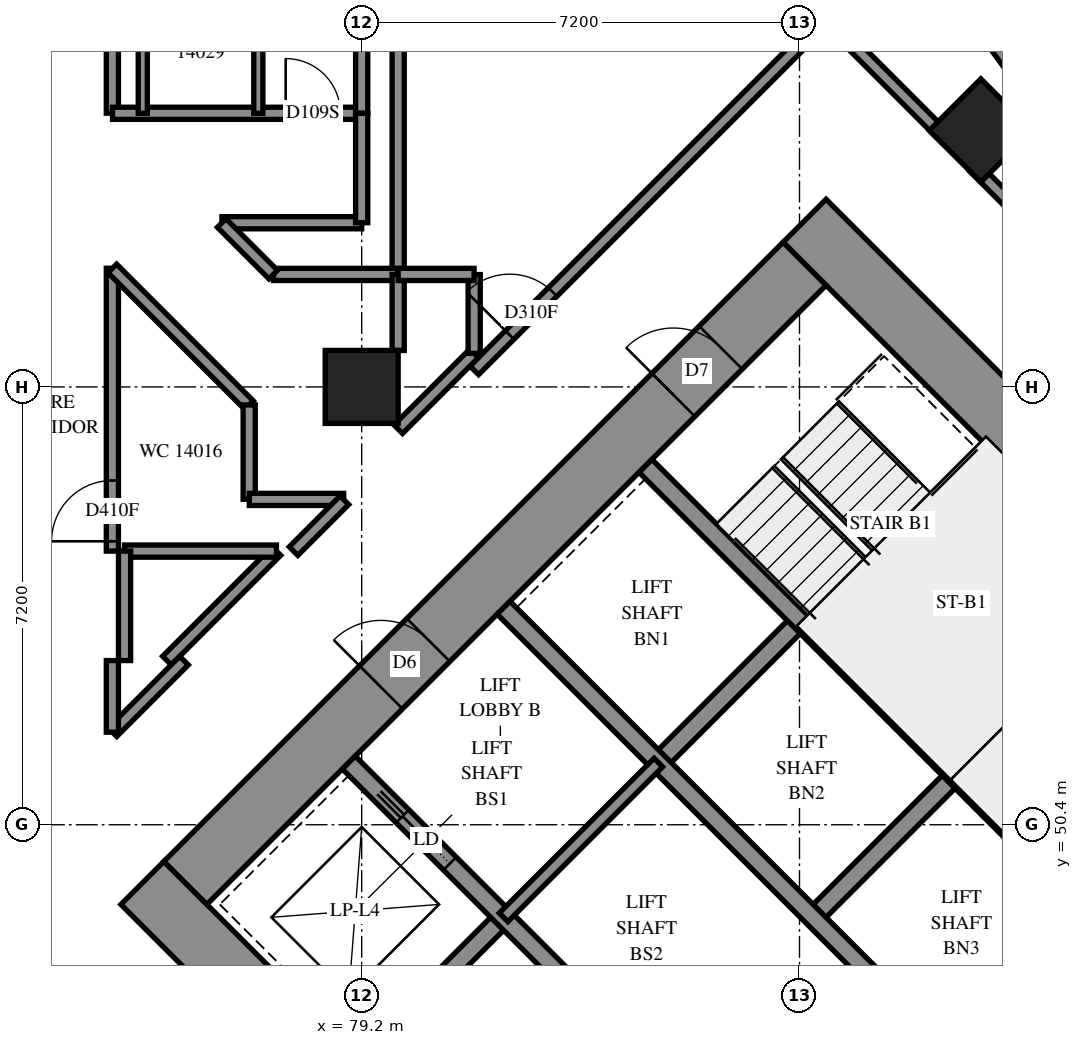
"""IFC4 building model, lengths in metres.
Left out: names, types, materials, properties, quantities, classifications, styles, units other than length and angle.
Written with IfcOpenShell. Run it as: python <this file> out.ifc"""

import sys

from ifc_helpers import new_model, si_unit, direction, frame, frame_2d, origin, origin_2d, place, context, subcontext, project, spatial, polyline, rectangle, outline, extrude, element, fill, save


model = new_model("IFC4")
c1 = context("Model", 3, precision=1e-05, world=origin(), true_north=direction((0.0, 1.0)))
c2 = subcontext(c1, "Body", "Model", "MODEL_VIEW")
j1 = project(units=[si_unit("LENGTHUNIT", "METRE"), si_unit("PLANEANGLEUNIT", "RADIAN")], contexts=[c1])
p1 = place(None, origin())
s1 = spatial("IfcSite", under=j1, at=p1, CompositionType="ELEMENT")
p2 = place(p1, origin())
s2 = spatial("IfcBuilding", under=s1, at=p2, CompositionType="ELEMENT")
p3 = place(p2, frame((0.0, 0.0, 54.2)))
s3 = spatial("IfcBuildingStorey", under=s2, at=p3, CompositionType="ELEMENT", Elevation=54.2)
for number, where, z_axis, x_axis in (
    (1, (79.2, 57.6, 0.0), (0.0, 0.0, 1.0), (1.0, 0.0, 0.0)),
    (2, (89.382, 61.818, 0.0), (0.0, 0.0, 1.0), (0.707, -0.707, 0.0)),
):
    element("IfcColumn", number, at=place(p3, frame(where, z_axis=z_axis, x_axis=x_axis)), inside=s3, PredefinedType="COLUMN", context=c2, shape_type="SweptSolid", body=[
        extrude(rectangle(XDim=1.2, YDim=1.2, at=origin_2d()), origin(), (0.0, 0.0, 1.0), 3.1),
    ])
p4 = place(p3, frame((75.594, 49.443, -0.3), z_axis=(0.0, 0.0, 1.0), x_axis=(0.7071037324, -0.70710983, 0.0)))
e3 = element("IfcWall", 3, at=p4, inside=s3, PredefinedType="SHEAR", context=c2, shape_type="SweptSolid", body=[
    extrude(rectangle(XDim=16.4, YDim=1.0, at=frame_2d((8.2, 0.0))), origin(), (0.0, 0.0, 1.0), 2.7),
])
p5 = place(p3, frame((86.483, 60.333, -0.3), z_axis=(0.0, 0.0, 1.0), x_axis=(0.70710983, -0.7071037324, 0.0)))
e4 = element("IfcWall", 4, at=p5, inside=s3, PredefinedType="SHEAR", context=c2, shape_type="SweptSolid", body=[
    extrude(rectangle(XDim=16.4, YDim=1.0, at=frame_2d((8.2, 0.0))), origin(), (0.0, 0.0, 1.0), 2.7),
])
p6 = place(p5, frame((11.0, 0.0, 0.3)))
e5 = element("IfcOpeningElement", 5, at=p6, cuts=e4, PredefinedType="OPENING", context=c2, shape_type="SweptSolid", body=[
    extrude(rectangle(XDim=0.8, YDim=2.1, at=frame_2d((0.4, 1.05))), frame((0.0, 0.51, 0.0), z_axis=(0.0, -1.0, 0.0), x_axis=(1.0, 0.0, 0.0)), (0.0, 0.0, 1.0), 1.02),
])
p7 = place(p3, frame((76.301, 49.443, -0.3), z_axis=(0.0, 0.0, 1.0), x_axis=(0.7071067812, 0.7071067812, 0.0)))
e6 = element("IfcWall", 6, at=p7, inside=s3, PredefinedType="SHEAR", context=c2, shape_type="SweptSolid", body=[
    extrude(rectangle(XDim=14.4, YDim=1.0, at=frame_2d((7.2, 0.0))), origin(), (0.0, 0.0, 1.0), 2.7),
])
p8 = place(p7, frame((4.55, 0.0, 0.3)))
e7 = element("IfcOpeningElement", 7, at=p8, cuts=e6, PredefinedType="OPENING", context=c2, shape_type="SweptSolid", body=[
    extrude(rectangle(XDim=1.1, YDim=2.1, at=frame_2d((0.55, 1.05))), frame((0.0, 0.51, 0.0), z_axis=(0.0, -1.0, 0.0), x_axis=(1.0, 0.0, 0.0)), (0.0, 0.0, 1.0), 1.02),
])
p9 = place(p7, frame((11.35, 0.0, 0.3)))
e8 = element("IfcOpeningElement", 8, at=p9, cuts=e6, PredefinedType="OPENING", context=c2, shape_type="SweptSolid", body=[
    extrude(rectangle(XDim=1.1, YDim=2.1, at=frame_2d((0.55, 1.05))), frame((0.0, 0.51, 0.0), z_axis=(0.0, -1.0, 0.0), x_axis=(1.0, 0.0, 0.0)), (0.0, 0.0, 1.0), 1.02),
])
p10 = place(p3, frame((87.19, 38.554, -0.3), z_axis=(0.0, 0.0, 1.0), x_axis=(0.707103309, 0.7071102534, 0.0)))
e9 = element("IfcWall", 9, at=p10, inside=s3, PredefinedType="SHEAR", context=c2, shape_type="SweptSolid", body=[
    extrude(rectangle(XDim=14.4, YDim=1.0, at=frame_2d((7.2, 0.0))), origin(), (0.0, 0.0, 1.0), 2.7),
])
p11 = place(p10, frame((4.55, 0.0, 0.3)))
e10 = element("IfcOpeningElement", 10, at=p11, cuts=e9, PredefinedType="OPENING", context=c2, shape_type="SweptSolid", body=[
    extrude(rectangle(XDim=1.1, YDim=2.1, at=frame_2d((0.55, 1.05))), frame((0.0, 0.51, 0.0), z_axis=(0.0, -1.0, 0.0), x_axis=(1.0, 0.0, 0.0)), (0.0, 0.0, 1.0), 1.02),
])
p12 = place(p10, frame((11.35, 0.0, 0.3)))
e11 = element("IfcOpeningElement", 11, at=p12, cuts=e9, PredefinedType="OPENING", context=c2, shape_type="SweptSolid", body=[
    extrude(rectangle(XDim=1.1, YDim=2.1, at=frame_2d((0.55, 1.05))), frame((0.0, 0.51, 0.0), z_axis=(0.0, -1.0, 0.0), x_axis=(1.0, 0.0, 0.0)), (0.0, 0.0, 1.0), 1.02),
])
for number, where, z_axis, x_axis in (
    (12, (79.2, 46.544, 0.0), (0.0, 0.0, 1.0), (0.707, 0.707, 0.0)),
    (13, (84.079, 51.423, 0.0), (0.0, 0.0, 1.0), (0.707, 0.707, 0.0)),
):
    element("IfcWall", number, at=place(p3, frame(where, z_axis=z_axis, x_axis=x_axis)), inside=s3, PredefinedType="SOLIDWALL", context=c2, shape_type="SweptSolid", body=[
        extrude(rectangle(XDim=3.3, YDim=0.3, at=frame_2d((1.65, 0.0))), origin(), (0.0, 0.0, 1.0), 3.1),
    ])
for number, where, z_axis, x_axis in (
    (14, (86.625, 48.878, 0.0), (0.0, 0.0, 1.0), (0.707, 0.707, 0.0)),
    (15, (89.17, 46.332, 0.0), (0.0, 0.0, 1.0), (0.707, 0.707, 0.0)),
):
    element("IfcWall", number, at=place(p3, frame(where, z_axis=z_axis, x_axis=x_axis)), inside=s3, PredefinedType="SOLIDWALL", context=c2, shape_type="SweptSolid", body=[
        extrude(rectangle(XDim=3.3, YDim=0.3, at=frame_2d((1.65, 0.0))), origin(), (0.0, 0.0, 1.0), 3.1),
    ])
p13 = place(p3, frame((78.988, 51.423, 0.0), z_axis=(0.0, 0.0, 1.0), x_axis=(0.7071067812, -0.7071067812, 0.0)))
e16 = element("IfcWall", 16, at=p13, inside=s3, PredefinedType="SOLIDWALL", context=c2, shape_type="SweptSolid", body=[
    extrude(rectangle(XDim=14.4, YDim=0.3, at=frame_2d((7.2, 0.0))), origin(), (0.0, 0.0, 1.0), 3.1),
])
p14 = place(p13, frame((1.25, 0.0, 0.0)))
e17 = element("IfcOpeningElement", 17, at=p14, cuts=e16, PredefinedType="OPENING", context=c2, shape_type="SweptSolid", body=[
    extrude(rectangle(XDim=1.1, YDim=2.1, at=frame_2d((0.55, 1.05))), frame((0.0, 0.16, 0.0), z_axis=(0.0, -1.0, 0.0), x_axis=(1.0, 0.0, 0.0)), (0.0, 0.0, 1.0), 0.32),
])
p15 = place(p13, frame((4.85, 0.0, 0.0)))
e18 = element("IfcOpeningElement", 18, at=p15, cuts=e16, PredefinedType="OPENING", context=c2, shape_type="SweptSolid", body=[
    extrude(rectangle(XDim=1.1, YDim=2.1, at=frame_2d((0.55, 1.05))), frame((0.0, 0.16, 0.0), z_axis=(0.0, -1.0, 0.0), x_axis=(1.0, 0.0, 0.0)), (0.0, 0.0, 1.0), 0.32),
])
p16 = place(p13, frame((8.45, 0.0, 0.0)))
e19 = element("IfcOpeningElement", 19, at=p16, cuts=e16, PredefinedType="OPENING", context=c2, shape_type="SweptSolid", body=[
    extrude(rectangle(XDim=1.1, YDim=2.1, at=frame_2d((0.55, 1.05))), frame((0.0, 0.16, 0.0), z_axis=(0.0, -1.0, 0.0), x_axis=(1.0, 0.0, 0.0)), (0.0, 0.0, 1.0), 0.32),
])
p17 = place(p13, frame((12.05, 0.0, 0.0)))
e20 = element("IfcOpeningElement", 20, at=p17, cuts=e16, PredefinedType="OPENING", context=c2, shape_type="SweptSolid", body=[
    extrude(rectangle(XDim=1.1, YDim=2.1, at=frame_2d((0.55, 1.05))), frame((0.0, 0.16, 0.0), z_axis=(0.0, -1.0, 0.0), x_axis=(1.0, 0.0, 0.0)), (0.0, 0.0, 1.0), 0.32),
])
p18 = place(p3, frame((81.534, 53.969, 0.0), z_axis=(0.0, 0.0, 1.0), x_axis=(0.707103309, -0.7071102534, 0.0)))
e21 = element("IfcWall", 21, at=p18, inside=s3, PredefinedType="SOLIDWALL", context=c2, shape_type="SweptSolid", body=[
    extrude(rectangle(XDim=14.4, YDim=0.3, at=frame_2d((7.2, 0.0))), origin(), (0.0, 0.0, 1.0), 3.1),
])
p19 = place(p18, frame((12.05, 0.0, 0.0)))
e22 = element("IfcOpeningElement", 22, at=p19, cuts=e21, PredefinedType="OPENING", context=c2, shape_type="SweptSolid", body=[
    extrude(rectangle(XDim=1.1, YDim=2.1, at=frame_2d((0.55, 1.05))), frame((0.0, 0.16, 0.0), z_axis=(0.0, -1.0, 0.0), x_axis=(1.0, 0.0, 0.0)), (0.0, 0.0, 1.0), 0.32),
])
for number, where, z_axis, x_axis in (
    (23, (83.867, 56.302, 0.0), (0.0, 0.0, 1.0), (0.707, -0.707, 0.0)),
    (24, (88.958, 51.211, 0.0), (0.0, 0.0, 1.0), (0.707, -0.707, 0.0)),
):
    element("IfcWall", number, at=place(p3, frame(where, z_axis=z_axis, x_axis=x_axis)), inside=s3, PredefinedType="SOLIDWALL", context=c2, shape_type="SweptSolid", body=[
        extrude(rectangle(XDim=7.2, YDim=0.3, at=frame_2d((3.6, 0.0))), origin(), (0.0, 0.0, 1.0), 3.1),
    ])
p20 = place(p3, frame((88.958, 51.211, 0.0), z_axis=(0.0, 0.0, 1.0), x_axis=(0.7071067812, 0.7071067812, 0.0)))
e25 = element("IfcWall", 25, at=p20, inside=s3, PredefinedType="SOLIDWALL", context=c2, shape_type="SweptSolid", body=[
    extrude(rectangle(XDim=4.2, YDim=0.3, at=frame_2d((2.1, 0.0))), origin(), (0.0, 0.0, 1.0), 3.1),
])
p21 = place(p3, frame((91.312, 61.191, 0.0), z_axis=(0.0, 0.0, 1.0), x_axis=(-0.5882793931, 0.8086577494, 0.0)))
e26 = element("IfcWall", 26, at=p21, inside=s3, PredefinedType="SOLIDWALL", context=c2, shape_type="SweptSolid", body=[
    extrude(outline(polyline([(0.043, -0.275), (3.522, -0.275), (3.435, 0.275), (-0.043, 0.275), (0.043, -0.275)])), origin(), (0.0, 0.0, 1.0), 3.1),
])
p22 = place(p21, frame((0.415, 0.0, 0.5)))
e27 = element("IfcOpeningElement", 27, at=p22, cuts=e26, PredefinedType="OPENING", context=c2, shape_type="SweptSolid", body=[
    extrude(rectangle(XDim=1.2, YDim=2.45, at=frame_2d((0.6, 1.225))), frame((0.0, 0.285, 0.0), z_axis=(0.0, -1.0, 0.0), x_axis=(1.0, 0.0, 0.0)), (0.0, 0.0, 1.0), 0.57),
])
p23 = place(p21, frame((1.933, 0.0, 0.5)))
e28 = element("IfcOpeningElement", 28, at=p23, cuts=e26, PredefinedType="OPENING", context=c2, shape_type="SweptSolid", body=[
    extrude(rectangle(XDim=1.2, YDim=2.45, at=frame_2d((0.6, 1.225))), frame((0.0, 0.285, 0.0), z_axis=(0.0, -1.0, 0.0), x_axis=(1.0, 0.0, 0.0)), (0.0, 0.0, 1.0), 0.57),
])
p24 = place(p3, frame((81.534, 48.878, 0.0), z_axis=(0.0, 0.0, 1.0), x_axis=(0.707092892, 0.7071206701, 0.0)))
e29 = element("IfcWall", 29, at=p24, inside=s3, PredefinedType="PARTITIONING", context=c2, shape_type="SweptSolid", body=[
    extrude(rectangle(XDim=3.6, YDim=0.2, at=frame_2d((1.8, 0.0))), origin(), (0.0, 0.0, 1.0), 3.1),
])
p25 = place(p3, frame((81.052, 57.873, 0.0), z_axis=(0.0, 0.0, 1.0), x_axis=(0.7071067812, 0.7071067812, 0.0)))
e30 = element("IfcWall", 30, at=p25, inside=s3, PredefinedType="PARTITIONING", context=c2, shape_type="SweptSolid", body=[
    extrude(rectangle(XDim=8.18, YDim=0.2, at=frame_2d((4.09, 0.0))), origin(), (0.0, 0.0, 1.0), 3.1),
])
p26 = place(p25, frame((0.823, 0.0, 0.0)))
e31 = element("IfcOpeningElement", 31, at=p26, cuts=e30, PredefinedType="OPENING", context=c2, shape_type="SweptSolid", body=[
    extrude(rectangle(XDim=1.0, YDim=2.1, at=frame_2d((0.5, 1.05))), frame((0.0, 0.11, 0.0), z_axis=(0.0, -1.0, 0.0), x_axis=(1.0, 0.0, 0.0)), (0.0, 0.0, 1.0), 0.22),
])
p27 = place(p3, frame((89.271, 61.215, 0.0), z_axis=(0.0, 0.0, 1.0), x_axis=(0.7071067812, -0.7071067812, 0.0)))
e32 = element("IfcWall", 32, at=p27, inside=s3, PredefinedType="PARTITIONING", context=c2, shape_type="SweptSolid", body=[
    extrude(rectangle(XDim=6.505, YDim=0.2, at=frame_2d((3.253, 0.0))), origin(), (0.0, 0.0, 1.0), 3.1),
])
p28 = place(p3, frame((75.1, 62.102, 0.0), z_axis=(0.0, 0.0, 1.0), x_axis=(0.0, 1.0, 0.0)))
e33 = element("IfcWall", 33, at=p28, inside=s3, PredefinedType="PARTITIONING", context=c2, shape_type="SweptSolid", body=[
    extrude(rectangle(XDim=5.798, YDim=0.2, at=frame_2d((2.899, 0.0))), origin(), (0.0, 0.0, 1.0), 3.1),
])
p29 = place(p3, frame((79.8, 59.45, 0.0), z_axis=(0.0, 0.0, 1.0), x_axis=(0.0, 1.0, 0.0)))
e34 = element("IfcWall", 34, at=p29, inside=s3, PredefinedType="PARTITIONING", context=c2, shape_type="SweptSolid", body=[
    extrude(rectangle(XDim=4.75, YDim=0.2, at=frame_2d((2.375, 0.0))), origin(), (0.0, 0.0, 1.0), 3.1),
])
p30 = place(p3, frame((75.1, 54.9, 0.0), z_axis=(0.0, 0.0, 1.0), x_axis=(0.0, 1.0, 0.0)))
e35 = element("IfcWall", 35, at=p30, inside=s3, PredefinedType="PARTITIONING", context=c2, shape_type="SweptSolid", body=[
    extrude(rectangle(XDim=4.652, YDim=0.2, at=frame_2d((2.326, 0.0))), origin(), (0.0, 0.0, 1.0), 3.1),
])
p31 = place(p30, frame((0.161, 0.0, 0.0)))
e36 = element("IfcOpeningElement", 36, at=p31, cuts=e35, PredefinedType="OPENING", context=c2, shape_type="SweptSolid", body=[
    extrude(rectangle(XDim=1.0, YDim=2.1, at=frame_2d((0.5, 1.05))), frame((0.0, 0.11, 0.0), z_axis=(0.0, -1.0, 0.0), x_axis=(1.0, 0.0, 0.0)), (0.0, 0.0, 1.0), 0.22),
])
p32 = place(p3, frame((75.102, 62.1, 0.0), z_axis=(0.0, 0.0, 1.0), x_axis=(1.0, 0.0, 0.0)))
e37 = element("IfcWall", 37, at=p32, inside=s3, PredefinedType="PARTITIONING", context=c2, shape_type="SweptSolid", body=[
    extrude(rectangle(XDim=4.098, YDim=0.2, at=frame_2d((2.049, 0.0))), origin(), (0.0, 0.0, 1.0), 3.1),
])
p33 = place(p32, frame((2.848, 0.0, 0.0)))
e38 = element("IfcOpeningElement", 38, at=p33, cuts=e37, PredefinedType="OPENING", context=c2, shape_type="SweptSolid", body=[
    extrude(rectangle(XDim=0.9, YDim=2.1, at=frame_2d((0.45, 1.05))), frame((0.0, 0.11, 0.0), z_axis=(0.0, -1.0, 0.0), x_axis=(1.0, 0.0, 0.0)), (0.0, 0.0, 1.0), 0.22),
])
p34 = place(p3, frame((75.099, 59.549, 0.0), z_axis=(0.0, 0.0, 1.0), x_axis=(0.7071067812, -0.7071067812, 0.0)))
e39 = element("IfcWall", 39, at=p34, inside=s3, PredefinedType="PARTITIONING", context=c2, shape_type="SweptSolid", body=[
    extrude(rectangle(XDim=3.179, YDim=0.2, at=frame_2d((1.59, 0.0))), origin(), (0.0, 0.0, 1.0), 3.1),
])
p35 = place(p3, frame((86.841, 63.659, 0.0), z_axis=(0.0, 0.0, 1.0), x_axis=(0.7067795096, -0.7074339014, 0.0)))
e40 = element("IfcWall", 40, at=p35, inside=s3, PredefinedType="PARTITIONING", context=c2, shape_type="SweptSolid", body=[
    extrude(rectangle(XDim=2.751, YDim=0.2, at=frame_2d((1.375, 0.0))), origin(), (0.0, 0.0, 1.0), 3.1),
])
p36 = place(p3, frame((75.997, 53.101, 0.0), z_axis=(0.0, 0.0, 1.0), x_axis=(0.7071067812, 0.7071067812, 0.0)))
e41 = element("IfcWall", 41, at=p36, inside=s3, PredefinedType="PARTITIONING", context=c2, shape_type="SweptSolid", body=[
    extrude(rectangle(XDim=2.546, YDim=0.2, at=frame_2d((1.273, 0.0))), origin(), (0.0, 0.0, 1.0), 3.1),
])
p37 = place(p3, frame((75.3, 54.9, 0.0), z_axis=(0.0, 0.0, 1.0), x_axis=(1.0, 0.0, 0.0)))
e42 = element("IfcWall", 42, at=p37, inside=s3, PredefinedType="PARTITIONING", context=c2, shape_type="SweptSolid", body=[
    extrude(rectangle(XDim=2.498, YDim=0.2, at=frame_2d((1.249, 0.0))), origin(), (0.0, 0.0, 1.0), 3.1),
])
for number, where, z_axis, x_axis in (
    (43, (75.6, 62.1, 0.0), (0.0, 0.0, 1.0), (0.0, 1.0, 0.0)),
    (44, (77.5, 62.1, 0.0), (0.0, 0.0, 1.0), (0.0, 1.0, 0.0)),
):
    element("IfcWall", number, at=place(p3, frame(where, z_axis=z_axis, x_axis=x_axis)), inside=s3, PredefinedType="PARTITIONING", context=c2, shape_type="SweptSolid", body=[
        extrude(rectangle(XDim=2.4, YDim=0.15, at=frame_2d((1.2, 0.0))), origin(), (0.0, 0.0, 1.0), 3.1),
    ])
p38 = place(p3, frame((76.902, 60.3, 0.0), z_axis=(0.0, 0.0, 1.0), x_axis=(1.0, 0.0, 0.0)))
e45 = element("IfcWall", 45, at=p38, inside=s3, PredefinedType="PARTITIONING", context=c2, shape_type="SweptSolid", body=[
    extrude(rectangle(XDim=2.298, YDim=0.2, at=frame_2d((1.149, 0.0))), origin(), (0.0, 0.0, 1.0), 3.1),
])
p39 = place(p3, frame((79.2, 62.1, 0.0), z_axis=(0.0, 0.0, 1.0), x_axis=(0.0, 1.0, 0.0)))
e46 = element("IfcWall", 46, at=p39, inside=s3, PredefinedType="PARTITIONING", context=c2, shape_type="SweptSolid", body=[
    extrude(rectangle(XDim=2.1, YDim=0.2, at=frame_2d((1.05, 0.0))), origin(), (0.0, 0.0, 1.0), 3.1),
])
p40 = place(p3, frame((77.75, 59.45, 0.0), z_axis=(0.0, 0.0, 1.0), x_axis=(1.0, 0.0, 0.0)))
e47 = element("IfcWall", 47, at=p40, inside=s3, PredefinedType="PARTITIONING", context=c2, shape_type="SweptSolid", body=[
    extrude(rectangle(XDim=2.05, YDim=0.2, at=frame_2d((1.025, 0.0))), origin(), (0.0, 0.0, 1.0), 3.1),
])
for number, where, z_axis, x_axis in (
    (48, (79.2, 60.3, 0.0), (0.0, 0.0, 1.0), (0.0, 1.0, 0.0)),
    (49, (75.3, 53.1, 0.0), (0.0, 0.0, 1.0), (0.0, 1.0, 0.0)),
):
    element("IfcWall", number, at=place(p3, frame(where, z_axis=z_axis, x_axis=x_axis)), inside=s3, PredefinedType="PARTITIONING", context=c2, shape_type="SweptSolid", body=[
        extrude(rectangle(XDim=1.8, YDim=0.2, at=frame_2d((0.9, 0.0))), origin(), (0.0, 0.0, 1.0), 3.1),
    ])
p41 = place(p3, frame((79.801, 56.905, 0.0), z_axis=(0.0, 0.0, 1.0), x_axis=(0.7071067812, 0.7071067812, 0.0)))
e50 = element("IfcWall", 50, at=p41, inside=s3, PredefinedType="PARTITIONING", context=c2, shape_type="SweptSolid", body=[
    extrude(rectangle(XDim=1.765, YDim=0.2, at=frame_2d((0.882, 0.0))), origin(), (0.0, 0.0, 1.0), 3.1),
])
p42 = place(p3, frame((75.102, 51.922, 0.0), z_axis=(0.0, 0.0, 1.0), x_axis=(0.7071067812, 0.7071067812, 0.0)))
e51 = element("IfcWall", 51, at=p42, inside=s3, PredefinedType="PARTITIONING", context=c2, shape_type="SweptSolid", body=[
    extrude(rectangle(XDim=1.663, YDim=0.2, at=frame_2d((0.832, 0.0))), origin(), (0.0, 0.0, 1.0), 3.1),
])
for number, where, z_axis, x_axis in (
    (52, (77.35, 55.752, 0.0), (0.0, 0.0, 1.0), (0.0, 1.0, 0.0)),
    (53, (77.352, 55.75, 0.0), (0.0, 0.0, 1.0), (1.0, 0.0, 0.0)),
):
    element("IfcWall", number, at=place(p3, frame(where, z_axis=z_axis, x_axis=x_axis)), inside=s3, PredefinedType="PARTITIONING", context=c2, shape_type="SweptSolid", body=[
        extrude(rectangle(XDim=1.552, YDim=0.2, at=frame_2d((0.776, 0.0))), origin(), (0.0, 0.0, 1.0), 3.1),
    ])
p43 = place(p3, frame((81.05, 58.152, 0.0), z_axis=(0.0, 0.0, 1.0), x_axis=(0.0, 1.0, 0.0)))
e54 = element("IfcWall", 54, at=p43, inside=s3, PredefinedType="PARTITIONING", context=c2, shape_type="SweptSolid", body=[
    extrude(rectangle(XDim=1.296, YDim=0.2, at=frame_2d((0.648, 0.0))), origin(), (0.0, 0.0, 1.0), 3.1),
])
p44 = place(p3, frame((79.8, 58.2, 0.0), z_axis=(0.0, 0.0, 1.0), x_axis=(0.0, 1.0, 0.0)))
e55 = element("IfcWall", 55, at=p44, inside=s3, PredefinedType="PARTITIONING", context=c2, shape_type="SweptSolid", body=[
    extrude(rectangle(XDim=1.25, YDim=0.2, at=frame_2d((0.625, 0.0))), origin(), (0.0, 0.0, 1.0), 3.1),
])
p45 = place(p3, frame((79.8, 59.45, 0.0), z_axis=(0.0, 0.0, 1.0), x_axis=(1.0, 0.0, 0.0)))
e56 = element("IfcWall", 56, at=p45, inside=s3, PredefinedType="PARTITIONING", context=c2, shape_type="SweptSolid", body=[
    extrude(rectangle(XDim=1.248, YDim=0.2, at=frame_2d((0.624, 0.0))), origin(), (0.0, 0.0, 1.0), 3.1),
])
p46 = place(p3, frame((76.897, 60.295, 0.0), z_axis=(0.0, 0.0, 1.0), x_axis=(0.7071067812, -0.7071067812, 0.0)))
e57 = element("IfcWall", 57, at=p46, inside=s3, PredefinedType="PARTITIONING", context=c2, shape_type="SweptSolid", body=[
    extrude(rectangle(XDim=1.199, YDim=0.2, at=frame_2d((0.6, 0.0))), origin(), (0.0, 0.0, 1.0), 3.1),
])
p47 = place(p3, frame((78.079, 54.901, 0.0), z_axis=(0.0, 0.0, 1.0), x_axis=(0.7071067812, 0.7071067812, 0.0)))
e58 = element("IfcWall", 58, at=p47, inside=s3, PredefinedType="PARTITIONING", context=c2, shape_type="SweptSolid", body=[
    extrude(rectangle(XDim=1.182, YDim=0.2, at=frame_2d((0.591, 0.0))), origin(), (0.0, 0.0, 1.0), 3.1),
])
p48 = place(p3, frame((75.1, 51.922, 0.0), z_axis=(0.0, 0.0, 1.0), x_axis=(0.0, 1.0, 0.0)))
e59 = element("IfcWall", 59, at=p48, inside=s3, PredefinedType="PARTITIONING", context=c2, shape_type="SweptSolid", body=[
    extrude(rectangle(XDim=1.178, YDim=0.2, at=frame_2d((0.589, 0.0))), origin(), (0.0, 0.0, 1.0), 3.1),
])
p49 = place(p23, origin())
e60 = element("IfcWindow", 60, at=p49, inside=s3, PartitioningType="SINGLE_PANEL", PredefinedType="WINDOW", context=c2, shape_type="SweptSolid", body=[
    extrude(rectangle(XDim=1.2, YDim=2.45, at=frame_2d((0.6, 1.225))), frame((0.0, 0.155, 0.0), z_axis=(0.0, -1.0, 0.0), x_axis=(1.0, 0.0, 0.0)), (0.0, 0.0, 1.0), 0.06),
])
fill(e28, e60)
p50 = place(p8, origin())
e61 = element("IfcDoor", 61, at=p50, inside=s3, OperationType="DOUBLE_DOOR_SINGLE_SWING", PredefinedType="DOOR", context=c2, shape_type="SweptSolid", body=[
    extrude(rectangle(XDim=1.1, YDim=2.1, at=frame_2d((0.55, 1.05))), frame((0.0, 0.025, 0.0), z_axis=(0.0, -1.0, 0.0), x_axis=(1.0, 0.0, 0.0)), (0.0, 0.0, 1.0), 0.05),
])
fill(e7, e61)
p51 = place(p9, origin())
e62 = element("IfcDoor", 62, at=p51, inside=s3, OperationType="SINGLE_SWING_LEFT", PredefinedType="DOOR", context=c2, shape_type="SweptSolid", body=[
    extrude(rectangle(XDim=1.1, YDim=2.1, at=frame_2d((0.55, 1.05))), frame((0.0, 0.025, 0.0), z_axis=(0.0, -1.0, 0.0), x_axis=(1.0, 0.0, 0.0)), (0.0, 0.0, 1.0), 0.05),
])
fill(e8, e62)
p52 = place(p14, origin())
e63 = element("IfcDoor", 63, at=p52, inside=s3, OperationType="SLIDING_TO_LEFT", PredefinedType="DOOR", context=c2, shape_type="SweptSolid", body=[
    extrude(rectangle(XDim=1.1, YDim=2.1, at=frame_2d((0.55, 1.05))), frame((0.0, 0.025, 0.0), z_axis=(0.0, -1.0, 0.0), x_axis=(1.0, 0.0, 0.0)), (0.0, 0.0, 1.0), 0.05),
])
fill(e17, e63)
p53 = place(p31, origin())
e64 = element("IfcDoor", 64, at=p53, inside=s3, OperationType="SINGLE_SWING_LEFT", PredefinedType="DOOR", context=c2, shape_type="SweptSolid", body=[
    extrude(rectangle(XDim=1.0, YDim=2.1, at=frame_2d((0.5, 1.05))), frame((0.0, 0.025, 0.0), z_axis=(0.0, -1.0, 0.0), x_axis=(1.0, 0.0, 0.0)), (0.0, 0.0, 1.0), 0.05),
])
fill(e36, e64)
p54 = place(p33, origin())
e65 = element("IfcDoor", 65, at=p54, inside=s3, OperationType="SINGLE_SWING_LEFT", PredefinedType="DOOR", context=c2, shape_type="SweptSolid", body=[
    extrude(rectangle(XDim=0.9, YDim=2.1, at=frame_2d((0.45, 1.05))), frame((0.0, 0.025, 0.0), z_axis=(0.0, -1.0, 0.0), x_axis=(1.0, 0.0, 0.0)), (0.0, 0.0, 1.0), 0.05),
])
fill(e38, e65)
p55 = place(p26, origin())
e66 = element("IfcDoor", 66, at=p55, inside=s3, OperationType="SINGLE_SWING_RIGHT", PredefinedType="DOOR", context=c2, shape_type="SweptSolid", body=[
    extrude(rectangle(XDim=1.0, YDim=2.1, at=frame_2d((0.5, 1.05))), frame((0.0, 0.025, 0.0), z_axis=(0.0, -1.0, 0.0), x_axis=(1.0, 0.0, 0.0)), (0.0, 0.0, 1.0), 0.05),
])
fill(e31, e66)
save(model, sys.argv[1])
